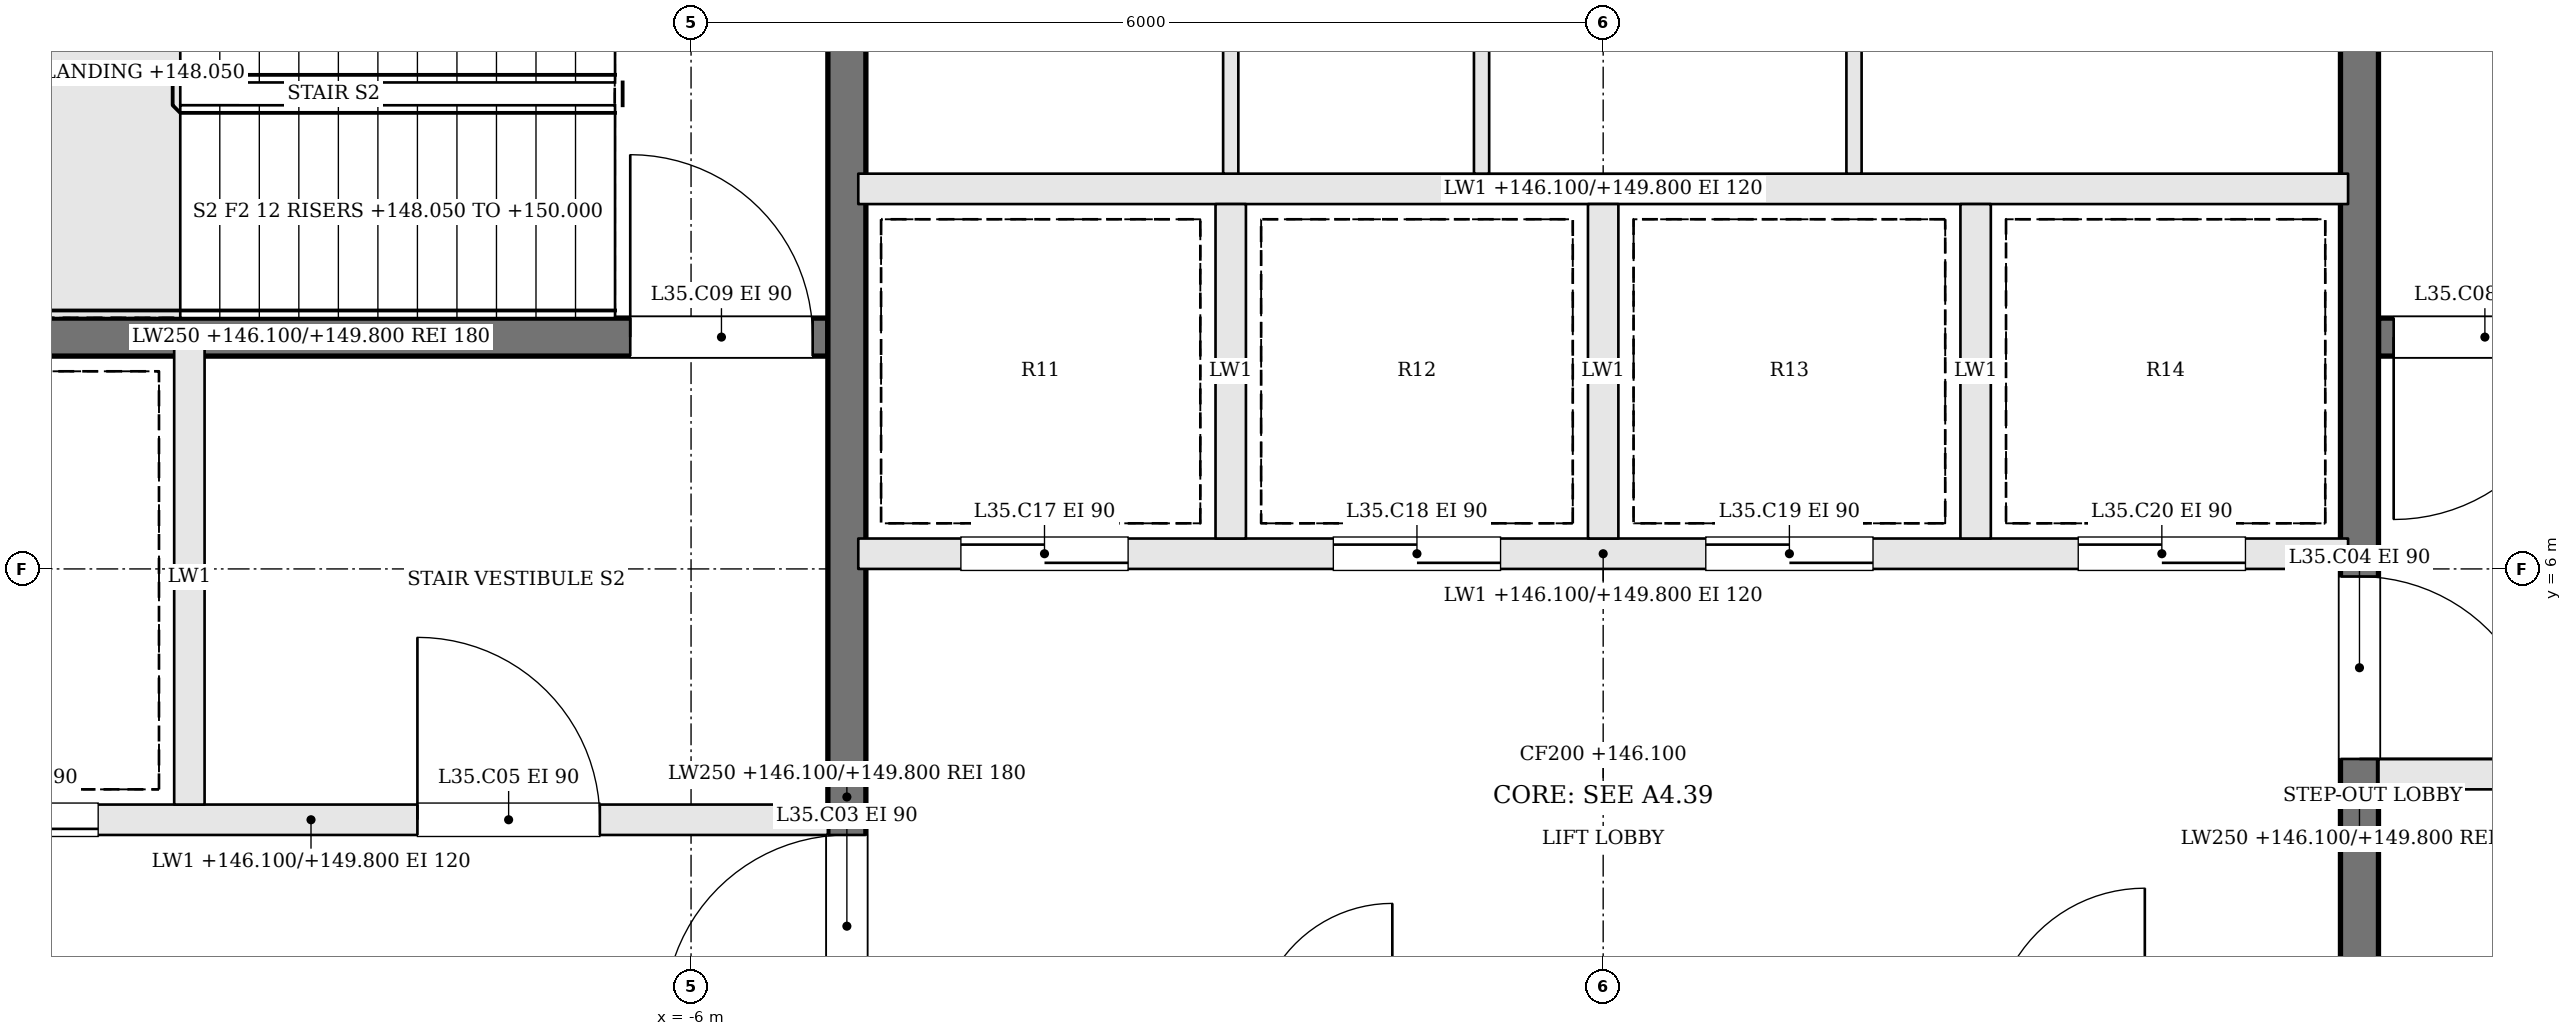
"""IFC4 building model, lengths in metres.
Left out: names, types, materials, properties, quantities, classifications, styles, units other than length and angle.
Written with IfcOpenShell. Run it as: python <this file> out.ifc"""

import sys

from ifc_helpers import new_model, si_unit, direction, frame, frame_2d, origin, place, context, subcontext, project, spatial, rectangle, extrude, element, fill, save


model = new_model("IFC4")
c1 = context("Model", 3, precision=1e-05, world=origin(), true_north=direction((0.0, 1.0)))
c2 = subcontext(c1, "Body", "Model", "MODEL_VIEW")
j1 = project(units=[si_unit("LENGTHUNIT", "METRE"), si_unit("PLANEANGLEUNIT", "RADIAN")], contexts=[c1])
p1 = place(None, origin())
s1 = spatial("IfcSite", under=j1, at=p1, CompositionType="ELEMENT")
p2 = place(p1, origin())
s2 = spatial("IfcBuilding", under=s1, at=p2, CompositionType="ELEMENT")
p3 = place(p2, frame((0.0, 0.0, 146.1)))
s3 = spatial("IfcBuildingStorey", under=s2, at=p3, CompositionType="ELEMENT", Elevation=146.1)
p4 = place(p3, frame((11.9, 7.525, 0.0), z_axis=(0.0, 0.0, 1.0), x_axis=(-1.0, 0.0, 0.0)))
e1 = element("IfcWall", 1, at=p4, inside=s3, PredefinedType="SOLIDWALL", context=c2, shape_type="SweptSolid", body=[
    extrude(rectangle(XDim=6.8, YDim=0.25, at=frame_2d((3.4, 0.0))), origin(), (0.0, 0.0, 1.0), 3.7),
])
p5 = place(p4, frame((5.5, 0.0, 0.0)))
e2 = element("IfcOpeningElement", 2, at=p5, cuts=e1, PredefinedType="OPENING", context=c2, shape_type="SweptSolid", body=[
    extrude(rectangle(XDim=1.2, YDim=2.1, at=frame_2d((0.6, 1.05))), frame((0.0, 0.135, 0.0), z_axis=(0.0, -1.0, 0.0), x_axis=(1.0, 0.0, 0.0)), (0.0, 0.0, 1.0), 0.27),
])
p6 = place(p3, frame((-11.9, 4.35, 0.0), z_axis=(0.0, 0.0, 1.0), x_axis=(1.0, 0.0, 0.0)))
e3 = element("IfcWall", 3, at=p6, inside=s3, PredefinedType="SOLIDWALL", context=c2, shape_type="SweptSolid", body=[
    extrude(rectangle(XDim=6.8, YDim=0.2, at=frame_2d((3.4, 0.0))), origin(), (0.0, 0.0, 1.0), 3.7),
])
p7 = place(p6, frame((4.1, 0.0, 0.0)))
e4 = element("IfcOpeningElement", 4, at=p7, cuts=e3, PredefinedType="OPENING", context=c2, shape_type="SweptSolid", body=[
    extrude(rectangle(XDim=1.2, YDim=2.1, at=frame_2d((0.6, 1.05))), frame((0.0, 0.11, 0.0), z_axis=(0.0, -1.0, 0.0), x_axis=(1.0, 0.0, 0.0)), (0.0, 0.0, 1.0), 0.22),
])
p8 = place(p6, frame((0.8, 0.0, 0.0)))
e5 = element("IfcOpeningElement", 5, at=p8, cuts=e3, PredefinedType="OPENING", context=c2, shape_type="SweptSolid", body=[
    extrude(rectangle(XDim=1.2, YDim=2.1, at=frame_2d((0.6, 1.05))), frame((0.0, 0.11, 0.0), z_axis=(0.0, -1.0, 0.0), x_axis=(1.0, 0.0, 0.0)), (0.0, 0.0, 1.0), 0.22),
])
p9 = place(p3, frame((11.9, 4.65, 0.0), z_axis=(0.0, 0.0, 1.0), x_axis=(-1.0, 0.0, 0.0)))
e6 = element("IfcWall", 6, at=p9, inside=s3, PredefinedType="SOLIDWALL", context=c2, shape_type="SweptSolid", body=[
    extrude(rectangle(XDim=6.8, YDim=0.2, at=frame_2d((3.4, 0.0))), origin(), (0.0, 0.0, 1.0), 3.7),
])
p10 = place(p9, frame((4.1, 0.0, 0.0)))
e7 = element("IfcOpeningElement", 7, at=p10, cuts=e6, PredefinedType="OPENING", context=c2, shape_type="SweptSolid", body=[
    extrude(rectangle(XDim=1.2, YDim=2.1, at=frame_2d((0.6, 1.05))), frame((0.0, 0.11, 0.0), z_axis=(0.0, -1.0, 0.0), x_axis=(1.0, 0.0, 0.0)), (0.0, 0.0, 1.0), 0.22),
])
p11 = place(p9, frame((0.8, 0.0, 0.0)))
e8 = element("IfcOpeningElement", 8, at=p11, cuts=e6, PredefinedType="OPENING", context=c2, shape_type="SweptSolid", body=[
    extrude(rectangle(XDim=1.2, YDim=2.1, at=frame_2d((0.6, 1.05))), frame((0.0, 0.11, 0.0), z_axis=(0.0, -1.0, 0.0), x_axis=(1.0, 0.0, 0.0)), (0.0, 0.0, 1.0), 0.22),
])
p12 = place(p3, frame((-11.9, 7.525, 0.0), z_axis=(0.0, 0.0, 1.0), x_axis=(1.0, 0.0, 0.0)))
e9 = element("IfcWall", 9, at=p12, inside=s3, PredefinedType="SOLIDWALL", context=c2, shape_type="SweptSolid", body=[
    extrude(rectangle(XDim=6.8, YDim=0.25, at=frame_2d((3.4, 0.0))), origin(), (0.0, 0.0, 1.0), 3.7),
])
p13 = place(p12, frame((5.5, 0.0, 0.0)))
e10 = element("IfcOpeningElement", 10, at=p13, cuts=e9, PredefinedType="OPENING", context=c2, shape_type="SweptSolid", body=[
    extrude(rectangle(XDim=1.2, YDim=2.1, at=frame_2d((0.6, 1.05))), frame((0.0, 0.135, 0.0), z_axis=(0.0, -1.0, 0.0), x_axis=(1.0, 0.0, 0.0)), (0.0, 0.0, 1.0), 0.27),
])
p14 = place(p3, frame((-9.3, 4.45, 0.0), z_axis=(0.0, 0.0, 1.0), x_axis=(0.0, 1.0, 0.0)))
e11 = element("IfcWall", 11, at=p14, inside=s3, PredefinedType="SOLIDWALL", context=c2, shape_type="SweptSolid", body=[
    extrude(rectangle(XDim=3.0, YDim=0.2, at=frame_2d((1.5, 0.0))), origin(), (0.0, 0.0, 1.0), 3.7),
])
p15 = place(p3, frame((-4.975, -1.9, 0.0), z_axis=(0.0, 0.0, 1.0), x_axis=(0.0, 1.0, 0.0)))
e12 = element("IfcWall", 12, at=p15, inside=s3, PredefinedType="SOLIDWALL", context=c2, shape_type="SweptSolid", body=[
    extrude(rectangle(XDim=12.8, YDim=0.25, at=frame_2d((6.4, 0.0))), origin(), (0.0, 0.0, 1.0), 3.7),
])
p16 = place(p15, frame((4.95, 0.0, 0.0)))
e13 = element("IfcOpeningElement", 13, at=p16, cuts=e12, PredefinedType="OPENING", context=c2, shape_type="SweptSolid", body=[
    extrude(rectangle(XDim=1.2, YDim=2.1, at=frame_2d((0.6, 1.05))), frame((0.0, 0.135, 0.0), z_axis=(0.0, -1.0, 0.0), x_axis=(1.0, 0.0, 0.0)), (0.0, 0.0, 1.0), 0.27),
])
p17 = place(p3, frame((4.975, 10.9, 0.0), z_axis=(0.0, 0.0, 1.0), x_axis=(0.0, -1.0, 0.0)))
e14 = element("IfcWall", 14, at=p17, inside=s3, PredefinedType="SOLIDWALL", context=c2, shape_type="SweptSolid", body=[
    extrude(rectangle(XDim=12.8, YDim=0.25, at=frame_2d((6.4, 0.0))), origin(), (0.0, 0.0, 1.0), 3.7),
])
p18 = place(p17, frame((4.95, 0.0, 0.0)))
e15 = element("IfcOpeningElement", 15, at=p18, cuts=e14, PredefinedType="OPENING", context=c2, shape_type="SweptSolid", body=[
    extrude(rectangle(XDim=1.2, YDim=2.1, at=frame_2d((0.6, 1.05))), frame((0.0, 0.135, 0.0), z_axis=(0.0, -1.0, 0.0), x_axis=(1.0, 0.0, 0.0)), (0.0, 0.0, 1.0), 0.27),
])
p19 = place(p3, frame((-4.9, 6.1, 0.0), z_axis=(0.0, 0.0, 1.0), x_axis=(1.0, 0.0, 0.0)))
e16 = element("IfcWall", 16, at=p19, inside=s3, PredefinedType="SOLIDWALL", context=c2, shape_type="SweptSolid", body=[
    extrude(rectangle(XDim=9.8, YDim=0.2, at=frame_2d((4.9, 0.0))), origin(), (0.0, 0.0, 1.0), 3.7),
])
p20 = place(p19, frame((0.675, 0.0, 0.0)))
e17 = element("IfcOpeningElement", 17, at=p20, cuts=e16, PredefinedType="OPENING", context=c2, shape_type="SweptSolid", body=[
    extrude(rectangle(XDim=1.1, YDim=2.1, at=frame_2d((0.55, 1.05))), frame((0.0, 0.11, 0.0), z_axis=(0.0, -1.0, 0.0), x_axis=(1.0, 0.0, 0.0)), (0.0, 0.0, 1.0), 0.22),
])
p21 = place(p19, frame((3.125, 0.0, 0.0)))
e18 = element("IfcOpeningElement", 18, at=p21, cuts=e16, PredefinedType="OPENING", context=c2, shape_type="SweptSolid", body=[
    extrude(rectangle(XDim=1.1, YDim=2.1, at=frame_2d((0.55, 1.05))), frame((0.0, 0.11, 0.0), z_axis=(0.0, -1.0, 0.0), x_axis=(1.0, 0.0, 0.0)), (0.0, 0.0, 1.0), 0.22),
])
p22 = place(p19, frame((5.575, 0.0, 0.0)))
e19 = element("IfcOpeningElement", 19, at=p22, cuts=e16, PredefinedType="OPENING", context=c2, shape_type="SweptSolid", body=[
    extrude(rectangle(XDim=1.1, YDim=2.1, at=frame_2d((0.55, 1.05))), frame((0.0, 0.11, 0.0), z_axis=(0.0, -1.0, 0.0), x_axis=(1.0, 0.0, 0.0)), (0.0, 0.0, 1.0), 0.22),
])
p23 = place(p19, frame((8.025, 0.0, 0.0)))
e20 = element("IfcOpeningElement", 20, at=p23, cuts=e16, PredefinedType="OPENING", context=c2, shape_type="SweptSolid", body=[
    extrude(rectangle(XDim=1.1, YDim=2.1, at=frame_2d((0.55, 1.05))), frame((0.0, 0.11, 0.0), z_axis=(0.0, -1.0, 0.0), x_axis=(1.0, 0.0, 0.0)), (0.0, 0.0, 1.0), 0.22),
])
p24 = place(p3, frame((-4.9, 8.5, 0.0), z_axis=(0.0, 0.0, 1.0), x_axis=(1.0, 0.0, 0.0)))
e21 = element("IfcWall", 21, at=p24, inside=s3, PredefinedType="SOLIDWALL", context=c2, shape_type="SweptSolid", body=[
    extrude(rectangle(XDim=9.8, YDim=0.2, at=frame_2d((4.9, 0.0))), origin(), (0.0, 0.0, 1.0), 3.7),
])
for number, where, z_axis, x_axis in (
    (22, (-2.45, 6.2, 0.0), (0.0, 0.0, 1.0), (0.0, 1.0, 0.0)),
    (23, (0.0, 6.2, 0.0), (0.0, 0.0, 1.0), (0.0, 1.0, 0.0)),
    (24, (2.45, 6.2, 0.0), (0.0, 0.0, 1.0), (0.0, 1.0, 0.0)),
):
    element("IfcWall", number, at=place(p3, frame(where, z_axis=z_axis, x_axis=x_axis)), inside=s3, PredefinedType="SOLIDWALL", context=c2, shape_type="SweptSolid", body=[
        extrude(rectangle(XDim=2.2, YDim=0.2, at=frame_2d((1.1, 0.0))), origin(), (0.0, 0.0, 1.0), 3.7),
    ])
for number, where, z_axis, x_axis in (
    (25, (-2.45, 8.6, 0.0), (0.0, 0.0, 1.0), (0.0, 1.0, 0.0)),
    (26, (-0.8, 8.6, 0.0), (0.0, 0.0, 1.0), (0.0, 1.0, 0.0)),
    (27, (1.65, 8.6, 0.0), (0.0, 0.0, 1.0), (0.0, 1.0, 0.0)),
):
    element("IfcWall", number, at=place(p3, frame(where, z_axis=z_axis, x_axis=x_axis)), inside=s3, PredefinedType="PARTITIONING", context=c2, shape_type="SweptSolid", body=[
        extrude(rectangle(XDim=2.3, YDim=0.1, at=frame_2d((1.15, 0.0))), origin(), (0.0, 0.0, 1.0), 3.7),
    ])
p25 = place(p16, origin())
e28 = element("IfcDoor", 28, at=p25, inside=s3, OperationType="SINGLE_SWING_LEFT", PredefinedType="DOOR", context=c2, shape_type="SweptSolid", body=[
    extrude(rectangle(XDim=1.2, YDim=2.1, at=frame_2d((0.6, 1.05))), frame((0.0, 0.025, 0.0), z_axis=(0.0, -1.0, 0.0), x_axis=(1.0, 0.0, 0.0)), (0.0, 0.0, 1.0), 0.05),
])
fill(e13, e28)
p26 = place(p18, origin())
e29 = element("IfcDoor", 29, at=p26, inside=s3, OperationType="SINGLE_SWING_RIGHT", PredefinedType="DOOR", context=c2, shape_type="SweptSolid", body=[
    extrude(rectangle(XDim=1.2, YDim=2.1, at=frame_2d((0.6, 1.05))), frame((0.0, 0.025, 0.0), z_axis=(0.0, -1.0, 0.0), x_axis=(1.0, 0.0, 0.0)), (0.0, 0.0, 1.0), 0.05),
])
fill(e15, e29)
p27 = place(p7, origin())
e30 = element("IfcDoor", 30, at=p27, inside=s3, OperationType="SINGLE_SWING_LEFT", PredefinedType="DOOR", context=c2, shape_type="SweptSolid", body=[
    extrude(rectangle(XDim=1.2, YDim=2.1, at=frame_2d((0.6, 1.05))), frame((0.0, 0.025, 0.0), z_axis=(0.0, -1.0, 0.0), x_axis=(1.0, 0.0, 0.0)), (0.0, 0.0, 1.0), 0.05),
])
fill(e4, e30)
p28 = place(p5, origin())
e31 = element("IfcDoor", 31, at=p28, inside=s3, OperationType="SINGLE_SWING_RIGHT", PredefinedType="DOOR", context=c2, shape_type="SweptSolid", body=[
    extrude(rectangle(XDim=1.2, YDim=2.1, at=frame_2d((0.6, 1.05))), frame((0.0, 0.025, 0.0), z_axis=(0.0, -1.0, 0.0), x_axis=(1.0, 0.0, 0.0)), (0.0, 0.0, 1.0), 0.05),
])
fill(e2, e31)
p29 = place(p13, origin())
e32 = element("IfcDoor", 32, at=p29, inside=s3, OperationType="SINGLE_SWING_LEFT", PredefinedType="DOOR", context=c2, shape_type="SweptSolid", body=[
    extrude(rectangle(XDim=1.2, YDim=2.1, at=frame_2d((0.6, 1.05))), frame((0.0, 0.025, 0.0), z_axis=(0.0, -1.0, 0.0), x_axis=(1.0, 0.0, 0.0)), (0.0, 0.0, 1.0), 0.05),
])
fill(e10, e32)
p30 = place(p8, origin())
e33 = element("IfcDoor", 33, at=p30, inside=s3, OperationType="SLIDING_TO_RIGHT", PredefinedType="DOOR", context=c2, shape_type="SweptSolid", body=[
    extrude(rectangle(XDim=1.2, YDim=2.1, at=frame_2d((0.6, 1.05))), frame((0.0, 0.025, 0.0), z_axis=(0.0, -1.0, 0.0), x_axis=(1.0, 0.0, 0.0)), (0.0, 0.0, 1.0), 0.05),
])
fill(e5, e33)
p31 = place(p20, origin())
e34 = element("IfcDoor", 34, at=p31, inside=s3, OperationType="SLIDING_TO_RIGHT", PredefinedType="DOOR", context=c2, shape_type="SweptSolid", body=[
    extrude(rectangle(XDim=1.1, YDim=2.1, at=frame_2d((0.55, 1.05))), frame((0.0, 0.025, 0.0), z_axis=(0.0, -1.0, 0.0), x_axis=(1.0, 0.0, 0.0)), (0.0, 0.0, 1.0), 0.05),
])
fill(e17, e34)
p32 = place(p21, origin())
e35 = element("IfcDoor", 35, at=p32, inside=s3, OperationType="SLIDING_TO_LEFT", PredefinedType="DOOR", context=c2, shape_type="SweptSolid", body=[
    extrude(rectangle(XDim=1.1, YDim=2.1, at=frame_2d((0.55, 1.05))), frame((0.0, 0.025, 0.0), z_axis=(0.0, -1.0, 0.0), x_axis=(1.0, 0.0, 0.0)), (0.0, 0.0, 1.0), 0.05),
])
fill(e18, e35)
p33 = place(p22, origin())
e36 = element("IfcDoor", 36, at=p33, inside=s3, OperationType="SLIDING_TO_RIGHT", PredefinedType="DOOR", context=c2, shape_type="SweptSolid", body=[
    extrude(rectangle(XDim=1.1, YDim=2.1, at=frame_2d((0.55, 1.05))), frame((0.0, 0.025, 0.0), z_axis=(0.0, -1.0, 0.0), x_axis=(1.0, 0.0, 0.0)), (0.0, 0.0, 1.0), 0.05),
])
fill(e19, e36)
p34 = place(p23, origin())
e37 = element("IfcDoor", 37, at=p34, inside=s3, OperationType="SLIDING_TO_LEFT", PredefinedType="DOOR", context=c2, shape_type="SweptSolid", body=[
    extrude(rectangle(XDim=1.1, YDim=2.1, at=frame_2d((0.55, 1.05))), frame((0.0, 0.025, 0.0), z_axis=(0.0, -1.0, 0.0), x_axis=(1.0, 0.0, 0.0)), (0.0, 0.0, 1.0), 0.05),
])
fill(e20, e37)
save(model, sys.argv[1])
